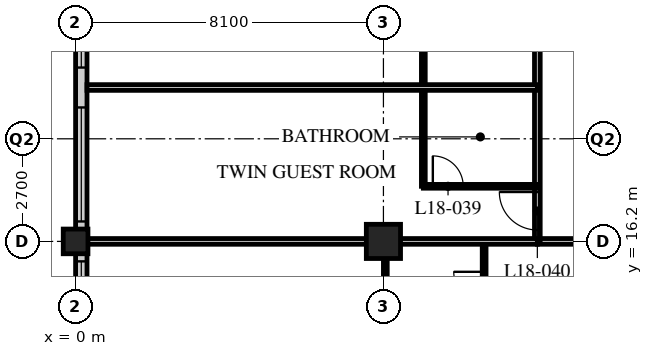
"""IFC4 building model, lengths in metres.
Left out: names, types, materials, properties, quantities, classifications, styles, units other than length and angle.
Written with IfcOpenShell. Run it as: python <this file> out.ifc"""

import sys

from ifc_helpers import new_model, si_unit, direction, frame, frame_2d, origin, origin_2d, place, context, subcontext, project, spatial, rectangle, hollow_rectangle, extrude, element, fill, save


model = new_model("IFC4")
c1 = context("Model", 3, precision=1e-05, world=origin(), true_north=direction((0.0, 1.0)))
c2 = subcontext(c1, "Body", "Model", "MODEL_VIEW")
j1 = project(units=[si_unit("LENGTHUNIT", "METRE"), si_unit("PLANEANGLEUNIT", "RADIAN")], contexts=[c1])
p1 = place(None, origin())
s1 = spatial("IfcSite", under=j1, at=p1, CompositionType="ELEMENT")
p2 = place(p1, origin())
s2 = spatial("IfcBuilding", under=s1, at=p2, CompositionType="ELEMENT")
p3 = place(p2, frame((0.0, 0.0, 73.8)))
s3 = spatial("IfcBuildingStorey", under=s2, at=p3, CompositionType="ELEMENT", Elevation=73.8)
p4 = place(p3, frame((0.0, 16.2, 0.0), z_axis=(0.0, 0.0, 1.0), x_axis=(1.0, 0.0, 0.0)))
e1 = element("IfcColumn", 1, at=p4, inside=s3, PredefinedType="COLUMN", context=c2, shape_type="SweptSolid", body=[
    extrude(hollow_rectangle(XDim=0.65, YDim=0.65, WallThickness=0.05, at=origin_2d()), origin(), (0.0, 0.0, 1.0), 3.4),
])
p5 = place(p3, frame((8.1, 16.2, 0.0), z_axis=(0.0, 0.0, 1.0), x_axis=(1.0, 0.0, 0.0)))
e2 = element("IfcColumn", 2, at=p5, inside=s3, PredefinedType="COLUMN", context=c2, shape_type="SweptSolid", body=[
    extrude(hollow_rectangle(XDim=0.9, YDim=0.9, WallThickness=0.09, at=origin_2d()), origin(), (0.0, 0.0, 1.0), 3.4),
])
p6 = place(p3, frame((0.15, 40.2, 0.0), z_axis=(0.0, 0.0, 1.0), x_axis=(0.0, -1.0, 0.0)))
e3 = element("IfcWall", 3, at=p6, inside=s3, PredefinedType="SOLIDWALL", context=c2, shape_type="SweptSolid", body=[
    extrude(rectangle(XDim=32.1, YDim=0.3, at=frame_2d((16.05, 0.0))), origin(), (0.0, 0.0, 1.0), 3.19),
])
p7 = place(p6, frame((0.225, 0.0, 0.9)))
e4 = element("IfcOpeningElement", 4, at=p7, cuts=e3, PredefinedType="OPENING", context=c2, shape_type="SweptSolid", body=[
    extrude(rectangle(XDim=3.0, YDim=2.0, at=frame_2d((1.5, 1.0))), frame((0.0, 0.16, 0.0), z_axis=(0.0, -1.0, 0.0), x_axis=(1.0, 0.0, 0.0)), (0.0, 0.0, 1.0), 0.32),
])
p8 = place(p6, frame((4.275, 0.0, 0.9)))
e5 = element("IfcOpeningElement", 5, at=p8, cuts=e3, PredefinedType="OPENING", context=c2, shape_type="SweptSolid", body=[
    extrude(rectangle(XDim=3.0, YDim=2.0, at=frame_2d((1.5, 1.0))), frame((0.0, 0.16, 0.0), z_axis=(0.0, -1.0, 0.0), x_axis=(1.0, 0.0, 0.0)), (0.0, 0.0, 1.0), 0.32),
])
p9 = place(p6, frame((8.325, 0.0, 0.9)))
e6 = element("IfcOpeningElement", 6, at=p9, cuts=e3, PredefinedType="OPENING", context=c2, shape_type="SweptSolid", body=[
    extrude(rectangle(XDim=3.0, YDim=2.0, at=frame_2d((1.5, 1.0))), frame((0.0, 0.16, 0.0), z_axis=(0.0, -1.0, 0.0), x_axis=(1.0, 0.0, 0.0)), (0.0, 0.0, 1.0), 0.32),
])
p10 = place(p6, frame((12.375, 0.0, 0.9)))
e7 = element("IfcOpeningElement", 7, at=p10, cuts=e3, PredefinedType="OPENING", context=c2, shape_type="SweptSolid", body=[
    extrude(rectangle(XDim=3.0, YDim=2.0, at=frame_2d((1.5, 1.0))), frame((0.0, 0.16, 0.0), z_axis=(0.0, -1.0, 0.0), x_axis=(1.0, 0.0, 0.0)), (0.0, 0.0, 1.0), 0.32),
])
p11 = place(p6, frame((16.425, 0.0, 0.9)))
e8 = element("IfcOpeningElement", 8, at=p11, cuts=e3, PredefinedType="OPENING", context=c2, shape_type="SweptSolid", body=[
    extrude(rectangle(XDim=3.0, YDim=2.0, at=frame_2d((1.5, 1.0))), frame((0.0, 0.16, 0.0), z_axis=(0.0, -1.0, 0.0), x_axis=(1.0, 0.0, 0.0)), (0.0, 0.0, 1.0), 0.32),
])
p12 = place(p6, frame((20.475, 0.0, 0.9)))
e9 = element("IfcOpeningElement", 9, at=p12, cuts=e3, PredefinedType="OPENING", context=c2, shape_type="SweptSolid", body=[
    extrude(rectangle(XDim=3.0, YDim=2.0, at=frame_2d((1.5, 1.0))), frame((0.0, 0.16, 0.0), z_axis=(0.0, -1.0, 0.0), x_axis=(1.0, 0.0, 0.0)), (0.0, 0.0, 1.0), 0.32),
])
p13 = place(p6, frame((24.525, 0.0, 0.9)))
e10 = element("IfcOpeningElement", 10, at=p13, cuts=e3, PredefinedType="OPENING", context=c2, shape_type="SweptSolid", body=[
    extrude(rectangle(XDim=3.0, YDim=2.0, at=frame_2d((1.5, 1.0))), frame((0.0, 0.16, 0.0), z_axis=(0.0, -1.0, 0.0), x_axis=(1.0, 0.0, 0.0)), (0.0, 0.0, 1.0), 0.32),
])
p14 = place(p6, frame((28.575, 0.0, 0.9)))
e11 = element("IfcOpeningElement", 11, at=p14, cuts=e3, PredefinedType="OPENING", context=c2, shape_type="SweptSolid", body=[
    extrude(rectangle(XDim=3.0, YDim=2.0, at=frame_2d((1.5, 1.0))), frame((0.0, 0.16, 0.0), z_axis=(0.0, -1.0, 0.0), x_axis=(1.0, 0.0, 0.0)), (0.0, 0.0, 1.0), 0.32),
])
p15 = place(p3, frame((12.15, 16.2, 0.0), z_axis=(0.0, 0.0, 1.0), x_axis=(1.0, 0.0, 0.0)))
e12 = element("IfcWall", 12, at=p15, inside=s3, PredefinedType="PARTITIONING", context=c2, shape_type="SweptSolid", body=[
    extrude(rectangle(XDim=36.45, YDim=0.15, at=frame_2d((18.225, 0.0))), origin(), (0.0, 0.0, 1.0), 2.578),
])
p16 = place(p15, frame((6.5, 0.0, 0.0)))
e13 = element("IfcOpeningElement", 13, at=p16, cuts=e12, PredefinedType="OPENING", context=c2, shape_type="SweptSolid", body=[
    extrude(rectangle(XDim=1.0, YDim=2.1, at=frame_2d((0.5, 1.05))), frame((0.0, 0.085, 0.0), z_axis=(0.0, -1.0, 0.0), x_axis=(1.0, 0.0, 0.0)), (0.0, 0.0, 1.0), 0.17),
])
p17 = place(p15, frame((8.4, 0.0, 0.0)))
e14 = element("IfcOpeningElement", 14, at=p17, cuts=e12, PredefinedType="OPENING", context=c2, shape_type="SweptSolid", body=[
    extrude(rectangle(XDim=1.0, YDim=2.1, at=frame_2d((0.5, 1.05))), frame((0.0, 0.085, 0.0), z_axis=(0.0, -1.0, 0.0), x_axis=(1.0, 0.0, 0.0)), (0.0, 0.0, 1.0), 0.17),
])
p18 = place(p15, frame((14.9, 0.0, 0.0)))
e15 = element("IfcOpeningElement", 15, at=p18, cuts=e12, PredefinedType="OPENING", context=c2, shape_type="SweptSolid", body=[
    extrude(rectangle(XDim=1.0, YDim=2.1, at=frame_2d((0.5, 1.05))), frame((0.0, 0.085, 0.0), z_axis=(0.0, -1.0, 0.0), x_axis=(1.0, 0.0, 0.0)), (0.0, 0.0, 1.0), 0.17),
])
p19 = place(p15, frame((16.5, 0.0, 0.0)))
e16 = element("IfcOpeningElement", 16, at=p19, cuts=e12, PredefinedType="OPENING", context=c2, shape_type="SweptSolid", body=[
    extrude(rectangle(XDim=1.0, YDim=2.1, at=frame_2d((0.5, 1.05))), frame((0.0, 0.085, 0.0), z_axis=(0.0, -1.0, 0.0), x_axis=(1.0, 0.0, 0.0)), (0.0, 0.0, 1.0), 0.17),
])
p20 = place(p15, frame((22.7, 0.0, 0.0)))
e17 = element("IfcOpeningElement", 17, at=p20, cuts=e12, PredefinedType="OPENING", context=c2, shape_type="SweptSolid", body=[
    extrude(rectangle(XDim=1.0, YDim=2.1, at=frame_2d((0.5, 1.05))), frame((0.0, 0.085, 0.0), z_axis=(0.0, -1.0, 0.0), x_axis=(1.0, 0.0, 0.0)), (0.0, 0.0, 1.0), 0.17),
])
p21 = place(p15, frame((24.9, 0.0, 0.0)))
e18 = element("IfcOpeningElement", 18, at=p21, cuts=e12, PredefinedType="OPENING", context=c2, shape_type="SweptSolid", body=[
    extrude(rectangle(XDim=1.0, YDim=2.1, at=frame_2d((0.5, 1.05))), frame((0.0, 0.085, 0.0), z_axis=(0.0, -1.0, 0.0), x_axis=(1.0, 0.0, 0.0)), (0.0, 0.0, 1.0), 0.17),
])
p22 = place(p15, frame((30.8, 0.0, 0.0)))
e19 = element("IfcOpeningElement", 19, at=p22, cuts=e12, PredefinedType="OPENING", context=c2, shape_type="SweptSolid", body=[
    extrude(rectangle(XDim=1.0, YDim=2.1, at=frame_2d((0.5, 1.05))), frame((0.0, 0.085, 0.0), z_axis=(0.0, -1.0, 0.0), x_axis=(1.0, 0.0, 0.0)), (0.0, 0.0, 1.0), 0.17),
])
p23 = place(p15, frame((1.525, 0.0, 0.0)))
e20 = element("IfcOpeningElement", 20, at=p23, cuts=e12, PredefinedType="OPENING", context=c2, shape_type="SweptSolid", body=[
    extrude(rectangle(XDim=1.0, YDim=2.1, at=frame_2d((0.5, 1.05))), frame((0.0, 0.085, 0.0), z_axis=(0.0, -1.0, 0.0), x_axis=(1.0, 0.0, 0.0)), (0.0, 0.0, 1.0), 0.17),
])
p24 = place(p15, frame((33.925, 0.0, 0.0)))
e21 = element("IfcOpeningElement", 21, at=p24, cuts=e12, PredefinedType="OPENING", context=c2, shape_type="SweptSolid", body=[
    extrude(rectangle(XDim=1.0, YDim=2.1, at=frame_2d((0.5, 1.05))), frame((0.0, 0.085, 0.0), z_axis=(0.0, -1.0, 0.0), x_axis=(1.0, 0.0, 0.0)), (0.0, 0.0, 1.0), 0.17),
])
p25 = place(p3, frame((12.15, 16.2, 0.0), z_axis=(0.0, 0.0, 1.0), x_axis=(0.0, 1.0, 0.0)))
e22 = element("IfcWall", 22, at=p25, inside=s3, PredefinedType="PARTITIONING", context=c2, shape_type="SweptSolid", body=[
    extrude(rectangle(XDim=26.1, YDim=0.15, at=frame_2d((13.05, 0.0))), origin(), (0.0, 0.0, 1.0), 3.19),
])
p26 = place(p25, frame((0.3, 0.0, 0.0)))
e23 = element("IfcOpeningElement", 23, at=p26, cuts=e22, PredefinedType="OPENING", context=c2, shape_type="SweptSolid", body=[
    extrude(rectangle(XDim=1.0, YDim=2.1, at=frame_2d((0.5, 1.05))), frame((0.0, 0.085, 0.0), z_axis=(0.0, -1.0, 0.0), x_axis=(1.0, 0.0, 0.0)), (0.0, 0.0, 1.0), 0.17),
])
p27 = place(p25, frame((6.5, 0.0, 0.0)))
e24 = element("IfcOpeningElement", 24, at=p27, cuts=e22, PredefinedType="OPENING", context=c2, shape_type="SweptSolid", body=[
    extrude(rectangle(XDim=1.0, YDim=2.1, at=frame_2d((0.5, 1.05))), frame((0.0, 0.085, 0.0), z_axis=(0.0, -1.0, 0.0), x_axis=(1.0, 0.0, 0.0)), (0.0, 0.0, 1.0), 0.17),
])
p28 = place(p25, frame((13.55, 0.0, 0.0)))
e25 = element("IfcOpeningElement", 25, at=p28, cuts=e22, PredefinedType="OPENING", context=c2, shape_type="SweptSolid", body=[
    extrude(rectangle(XDim=1.0, YDim=2.1, at=frame_2d((0.5, 1.05))), frame((0.0, 0.085, 0.0), z_axis=(0.0, -1.0, 0.0), x_axis=(1.0, 0.0, 0.0)), (0.0, 0.0, 1.0), 0.17),
])
p29 = place(p25, frame((21.65, 0.0, 0.0)))
e26 = element("IfcOpeningElement", 26, at=p29, cuts=e22, PredefinedType="OPENING", context=c2, shape_type="SweptSolid", body=[
    extrude(rectangle(XDim=1.0, YDim=2.1, at=frame_2d((0.5, 1.05))), frame((0.0, 0.085, 0.0), z_axis=(0.0, -1.0, 0.0), x_axis=(1.0, 0.0, 0.0)), (0.0, 0.0, 1.0), 0.17),
])
p30 = place(p3, frame((9.15, 17.65, 0.0), z_axis=(0.0, 0.0, 1.0), x_axis=(0.0, 1.0, 0.0)))
e27 = element("IfcWall", 27, at=p30, inside=s3, PredefinedType="PARTITIONING", context=c2, shape_type="SweptSolid", body=[
    extrude(rectangle(XDim=4.9, YDim=0.1, at=frame_2d((2.45, 0.0))), origin(), (0.0, 0.0, 1.0), 3.19),
])
p31 = place(p3, frame((12.15, 17.65, 0.0), z_axis=(0.0, 0.0, 1.0), x_axis=(-1.0, 0.0, 0.0)))
e28 = element("IfcWall", 28, at=p31, inside=s3, PredefinedType="PARTITIONING", context=c2, shape_type="SweptSolid", body=[
    extrude(rectangle(XDim=3.0, YDim=0.1, at=frame_2d((1.5, 0.0))), origin(), (0.0, 0.0, 1.0), 3.19),
])
p32 = place(p31, frame((1.95, 0.0, 0.0)))
e29 = element("IfcOpeningElement", 29, at=p32, cuts=e28, PredefinedType="OPENING", context=c2, shape_type="SweptSolid", body=[
    extrude(rectangle(XDim=0.8, YDim=2.1, at=frame_2d((0.4, 1.05))), frame((0.0, 0.06, 0.0), z_axis=(0.0, -1.0, 0.0), x_axis=(1.0, 0.0, 0.0)), (0.0, 0.0, 1.0), 0.12),
])
p33 = place(p3, frame((12.15, 20.25, 0.0), z_axis=(0.0, 0.0, 1.0), x_axis=(-1.0, 0.0, 0.0)))
e30 = element("IfcWall", 30, at=p33, inside=s3, PredefinedType="PARTITIONING", context=c2, shape_type="SweptSolid", body=[
    extrude(rectangle(XDim=11.85, YDim=0.15, at=frame_2d((5.925, 0.0))), origin(), (0.0, 0.0, 1.0), 3.19),
])
p34 = place(p3, frame((10.75, 16.2, 0.0), z_axis=(0.0, 0.0, 1.0), x_axis=(0.0, -1.0, 0.0)))
e31 = element("IfcWall", 31, at=p34, inside=s3, PredefinedType="PARTITIONING", context=c2, shape_type="SweptSolid", body=[
    extrude(rectangle(XDim=2.4, YDim=0.1, at=frame_2d((1.2, 0.0))), origin(), (0.0, 0.0, 1.0), 3.19),
])
p35 = place(p34, frame((0.8, 0.0, 0.0)))
e32 = element("IfcOpeningElement", 32, at=p35, cuts=e31, PredefinedType="OPENING", context=c2, shape_type="SweptSolid", body=[
    extrude(rectangle(XDim=0.8, YDim=2.1, at=frame_2d((0.4, 1.05))), frame((0.0, 0.06, 0.0), z_axis=(0.0, -1.0, 0.0), x_axis=(1.0, 0.0, 0.0)), (0.0, 0.0, 1.0), 0.12),
])
p36 = place(p3, frame((8.15, 16.2, 0.0), z_axis=(0.0, 0.0, 1.0), x_axis=(0.0, -1.0, 0.0)))
e33 = element("IfcWall", 33, at=p36, inside=s3, PredefinedType="PARTITIONING", context=c2, shape_type="SweptSolid", body=[
    extrude(rectangle(XDim=2.4, YDim=0.1, at=frame_2d((1.2, 0.0))), origin(), (0.0, 0.0, 1.0), 2.578),
])
p37 = place(p3, frame((0.3, 16.2, 0.0), z_axis=(0.0, 0.0, 1.0), x_axis=(1.0, 0.0, 0.0)))
e34 = element("IfcWall", 34, at=p37, inside=s3, PredefinedType="PARTITIONING", context=c2, shape_type="SweptSolid", body=[
    extrude(rectangle(XDim=11.85, YDim=0.15, at=frame_2d((5.925, 0.0))), origin(), (0.0, 0.0, 1.0), 2.578),
])
p38 = place(p11, origin())
e35 = element("IfcWindow", 35, at=p38, inside=s3, PartitioningType="SINGLE_PANEL", PredefinedType="WINDOW", context=c2, shape_type="SweptSolid", body=[
    extrude(rectangle(XDim=3.0, YDim=2.0, at=frame_2d((1.5, 1.0))), frame((0.0, 0.03, 0.0), z_axis=(0.0, -1.0, 0.0), x_axis=(1.0, 0.0, 0.0)), (0.0, 0.0, 1.0), 0.06),
])
fill(e8, e35)
p39 = place(p12, origin())
e36 = element("IfcWindow", 36, at=p39, inside=s3, PartitioningType="SINGLE_PANEL", PredefinedType="WINDOW", context=c2, shape_type="SweptSolid", body=[
    extrude(rectangle(XDim=3.0, YDim=2.0, at=frame_2d((1.5, 1.0))), frame((0.0, 0.03, 0.0), z_axis=(0.0, -1.0, 0.0), x_axis=(1.0, 0.0, 0.0)), (0.0, 0.0, 1.0), 0.06),
])
fill(e9, e36)
p40 = place(p13, origin())
e37 = element("IfcWindow", 37, at=p40, inside=s3, PartitioningType="SINGLE_PANEL", PredefinedType="WINDOW", context=c2, shape_type="SweptSolid", body=[
    extrude(rectangle(XDim=3.0, YDim=2.0, at=frame_2d((1.5, 1.0))), frame((0.0, 0.03, 0.0), z_axis=(0.0, -1.0, 0.0), x_axis=(1.0, 0.0, 0.0)), (0.0, 0.0, 1.0), 0.06),
])
fill(e10, e37)
p41 = place(p32, origin())
e38 = element("IfcDoor", 38, at=p41, inside=s3, OperationType="SINGLE_SWING_LEFT", PredefinedType="DOOR", context=c2, shape_type="SweptSolid", body=[
    extrude(rectangle(XDim=0.8, YDim=2.1, at=frame_2d((0.4, 1.05))), frame((0.0, 0.025, 0.0), z_axis=(0.0, -1.0, 0.0), x_axis=(1.0, 0.0, 0.0)), (0.0, 0.0, 1.0), 0.05),
])
fill(e29, e38)
p42 = place(p26, origin())
e39 = element("IfcDoor", 39, at=p42, inside=s3, OperationType="SINGLE_SWING_RIGHT", PredefinedType="DOOR", context=c2, shape_type="SweptSolid", body=[
    extrude(rectangle(XDim=1.0, YDim=2.1, at=frame_2d((0.5, 1.05))), frame((0.0, 0.025, 0.0), z_axis=(0.0, -1.0, 0.0), x_axis=(1.0, 0.0, 0.0)), (0.0, 0.0, 1.0), 0.05),
])
fill(e23, e39)
p43 = place(p35, origin())
e40 = element("IfcDoor", 40, at=p43, inside=s3, OperationType="SINGLE_SWING_RIGHT", PredefinedType="DOOR", context=c2, shape_type="SweptSolid", body=[
    extrude(rectangle(XDim=0.8, YDim=2.1, at=frame_2d((0.4, 1.05))), frame((0.0, 0.025, 0.0), z_axis=(0.0, -1.0, 0.0), x_axis=(1.0, 0.0, 0.0)), (0.0, 0.0, 1.0), 0.05),
])
fill(e32, e40)
save(model, sys.argv[1])
